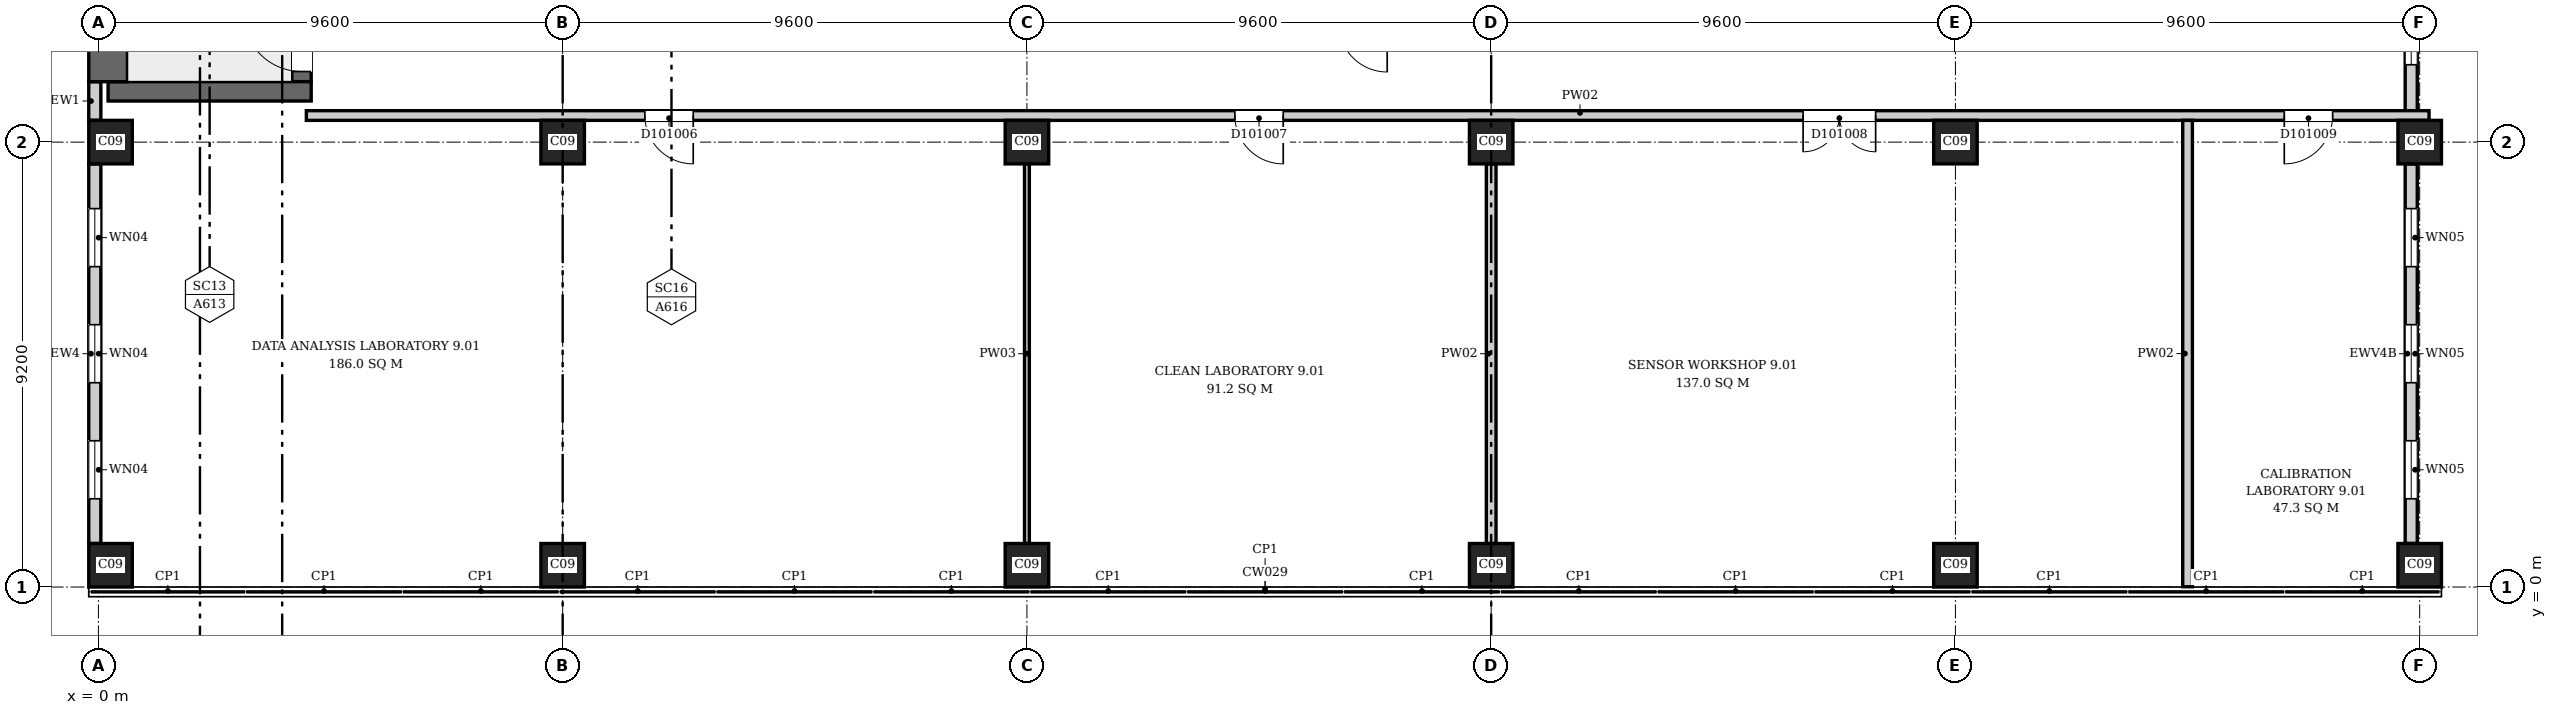
"""IFC4 building model, lengths in metres.
Left out: names, types, materials, properties, quantities, classifications, styles, units other than length and angle.
Written with IfcOpenShell. Run it as: python <this file> out.ifc"""

import sys

from ifc_helpers import new_model, si_unit, direction, frame, frame_2d, origin, origin_2d, place, context, subcontext, project, spatial, rectangle, extrude, element, fill, save


model = new_model("IFC4")
c1 = context("Model", 3, precision=1e-05, world=origin(), true_north=direction((0.0, 1.0)))
c2 = subcontext(c1, "Body", "Model", "MODEL_VIEW")
j1 = project(units=[si_unit("LENGTHUNIT", "METRE"), si_unit("PLANEANGLEUNIT", "RADIAN")], contexts=[c1])
p1 = place(None, origin())
s1 = spatial("IfcSite", under=j1, at=p1, CompositionType="ELEMENT")
p2 = place(p1, origin())
s2 = spatial("IfcBuilding", under=s1, at=p2, CompositionType="ELEMENT")
p3 = place(p2, frame((0.0, 0.0, 48.7)))
s3 = spatial("IfcBuildingStorey", under=s2, at=p3, CompositionType="ELEMENT", Elevation=48.7)
p4 = place(p3, frame((0.2, 10.25, 0.0), z_axis=(0.0, 0.0, 1.0), x_axis=(1.0, 0.0, 0.0)))
e1 = element("IfcWall", 1, at=p4, inside=s3, PredefinedType="SHEAR", context=c2, shape_type="SweptSolid", body=[
    extrude(rectangle(XDim=4.2, YDim=0.4, at=frame_2d((2.1, 0.0))), origin(), (0.0, 0.0, 1.0), 4.2),
])
p5 = place(p3, frame((0.2, 10.45, 0.0), z_axis=(0.0, 0.0, 1.0), x_axis=(0.0, 1.0, 0.0)))
e2 = element("IfcWall", 2, at=p5, inside=s3, PredefinedType="SHEAR", context=c2, shape_type="SweptSolid", body=[
    extrude(rectangle(XDim=6.6, YDim=0.8, at=frame_2d((3.3, 0.0))), origin(), (0.0, 0.0, 1.0), 4.2),
])
p6 = place(p3, frame((4.2, 10.45, 0.0), z_axis=(0.0, 0.0, 1.0), x_axis=(0.0, 1.0, 0.0)))
e3 = element("IfcWall", 3, at=p6, inside=s3, PredefinedType="SHEAR", context=c2, shape_type="SweptSolid", body=[
    extrude(rectangle(XDim=6.6, YDim=0.4, at=frame_2d((3.3, 0.0))), origin(), (0.0, 0.0, 1.0), 4.2),
])
p7 = place(p6, frame((0.21, 0.0, 0.0)))
e4 = element("IfcOpeningElement", 4, at=p7, cuts=e3, PredefinedType="OPENING", context=c2, shape_type="SweptSolid", body=[
    extrude(rectangle(XDim=1.2, YDim=2.1, at=frame_2d((0.6, 1.05))), frame((0.0, 0.21, 0.0), z_axis=(0.0, -1.0, 0.0), x_axis=(1.0, 0.0, 0.0)), (0.0, 0.0, 1.0), 0.42),
])
for number, where, z_axis, x_axis in (
    (5, (0.25, 0.45, 0.0), (0.0, 0.0, 1.0), (1.0, 0.0, 0.0)),
    (6, (9.6, 0.45, 0.0), (0.0, 0.0, 1.0), (1.0, 0.0, 0.0)),
    (7, (19.2, 0.45, 0.0), (0.0, 0.0, 1.0), (1.0, 0.0, 0.0)),
    (8, (28.8, 0.45, 0.0), (0.0, 0.0, 1.0), (1.0, 0.0, 0.0)),
    (9, (38.4, 0.45, 0.0), (0.0, 0.0, 1.0), (1.0, 0.0, 0.0)),
    (10, (48.0, 0.45, 0.0), (0.0, 0.0, 1.0), (1.0, 0.0, 0.0)),
    (11, (0.25, 9.2, 0.0), (0.0, 0.0, 1.0), (1.0, 0.0, 0.0)),
    (12, (9.6, 9.2, 0.0), (0.0, 0.0, 1.0), (1.0, 0.0, 0.0)),
    (13, (19.2, 9.2, 0.0), (0.0, 0.0, 1.0), (1.0, 0.0, 0.0)),
    (14, (28.8, 9.2, 0.0), (0.0, 0.0, 1.0), (1.0, 0.0, 0.0)),
    (15, (38.4, 9.2, 0.0), (0.0, 0.0, 1.0), (1.0, 0.0, 0.0)),
    (16, (48.0, 9.2, 0.0), (0.0, 0.0, 1.0), (1.0, 0.0, 0.0)),
):
    element("IfcColumn", number, at=place(p3, frame(where, z_axis=z_axis, x_axis=x_axis)), inside=s3, PredefinedType="COLUMN", context=c2, shape_type="SweptSolid", body=[
        extrude(rectangle(XDim=0.9, YDim=0.9, at=origin_2d()), origin(), (0.0, 0.0, 1.0), 4.2),
    ])
p8 = place(p3, frame((-0.074, 8.75, 0.0), z_axis=(0.0, 0.0, 1.0), x_axis=(0.0, -1.0, 0.0)))
e17 = element("IfcWall", 17, at=p8, inside=s3, PredefinedType="ELEMENTEDWALL", context=c2, shape_type="SweptSolid", body=[
    extrude(rectangle(XDim=7.85, YDim=0.25, at=frame_2d((3.925, 0.0))), origin(), (0.0, 0.0, 1.0), 3.9),
])
p9 = place(p8, frame((5.725, 0.0, 0.9)))
e18 = element("IfcOpeningElement", 18, at=p9, cuts=e17, PredefinedType="OPENING", context=c2, shape_type="SweptSolid", body=[
    extrude(rectangle(XDim=1.2, YDim=2.6, at=frame_2d((0.6, 1.3))), frame((0.0, 0.135, 0.0), z_axis=(0.0, -1.0, 0.0), x_axis=(1.0, 0.0, 0.0)), (0.0, 0.0, 1.0), 0.27),
])
p10 = place(p8, frame((3.325, 0.0, 0.9)))
e19 = element("IfcOpeningElement", 19, at=p10, cuts=e17, PredefinedType="OPENING", context=c2, shape_type="SweptSolid", body=[
    extrude(rectangle(XDim=1.2, YDim=2.6, at=frame_2d((0.6, 1.3))), frame((0.0, 0.135, 0.0), z_axis=(0.0, -1.0, 0.0), x_axis=(1.0, 0.0, 0.0)), (0.0, 0.0, 1.0), 0.27),
])
p11 = place(p8, frame((0.925, 0.0, 0.9)))
e20 = element("IfcOpeningElement", 20, at=p11, cuts=e17, PredefinedType="OPENING", context=c2, shape_type="SweptSolid", body=[
    extrude(rectangle(XDim=1.2, YDim=2.6, at=frame_2d((0.6, 1.3))), frame((0.0, 0.135, 0.0), z_axis=(0.0, -1.0, 0.0), x_axis=(1.0, 0.0, 0.0)), (0.0, 0.0, 1.0), 0.27),
])
p12 = place(p3, frame((-0.074, 10.45, 0.0), z_axis=(0.0, 0.0, 1.0), x_axis=(0.0, -1.0, 0.0)))
e21 = element("IfcWall", 21, at=p12, inside=s3, PredefinedType="ELEMENTEDWALL", context=c2, shape_type="SweptSolid", body=[
    extrude(rectangle(XDim=0.8, YDim=0.25, at=frame_2d((0.4, 0.0))), origin(), (0.0, 0.0, 1.0), 3.9),
])
p13 = place(p3, frame((47.825, 0.9, 0.0), z_axis=(0.0, 0.0, 1.0), x_axis=(0.0, 1.0, 0.0)))
e22 = element("IfcWall", 22, at=p13, inside=s3, PredefinedType="ELEMENTEDWALL", context=c2, shape_type="SweptSolid", body=[
    extrude(rectangle(XDim=7.85, YDim=0.25, at=frame_2d((3.925, 0.0))), origin(), (0.0, 0.0, 1.0), 3.3),
])
p14 = place(p13, frame((0.925, 0.0, 0.6)))
e23 = element("IfcOpeningElement", 23, at=p14, cuts=e22, PredefinedType="OPENING", context=c2, shape_type="SweptSolid", body=[
    extrude(rectangle(XDim=1.2, YDim=2.6, at=frame_2d((0.6, 1.3))), frame((0.0, 0.135, 0.0), z_axis=(0.0, -1.0, 0.0), x_axis=(1.0, 0.0, 0.0)), (0.0, 0.0, 1.0), 0.27),
])
p15 = place(p13, frame((3.325, 0.0, 0.6)))
e24 = element("IfcOpeningElement", 24, at=p15, cuts=e22, PredefinedType="OPENING", context=c2, shape_type="SweptSolid", body=[
    extrude(rectangle(XDim=1.2, YDim=2.6, at=frame_2d((0.6, 1.3))), frame((0.0, 0.135, 0.0), z_axis=(0.0, -1.0, 0.0), x_axis=(1.0, 0.0, 0.0)), (0.0, 0.0, 1.0), 0.27),
])
p16 = place(p13, frame((5.725, 0.0, 0.6)))
e25 = element("IfcOpeningElement", 25, at=p16, cuts=e22, PredefinedType="OPENING", context=c2, shape_type="SweptSolid", body=[
    extrude(rectangle(XDim=1.2, YDim=2.6, at=frame_2d((0.6, 1.3))), frame((0.0, 0.135, 0.0), z_axis=(0.0, -1.0, 0.0), x_axis=(1.0, 0.0, 0.0)), (0.0, 0.0, 1.0), 0.27),
])
p17 = place(p3, frame((47.825, 9.65, 0.0), z_axis=(0.0, 0.0, 1.0), x_axis=(0.0, 1.0, 0.0)))
e26 = element("IfcWall", 26, at=p17, inside=s3, PredefinedType="ELEMENTEDWALL", context=c2, shape_type="SweptSolid", body=[
    extrude(rectangle(XDim=8.3, YDim=0.25, at=frame_2d((4.15, 0.0))), origin(), (0.0, 0.0, 1.0), 3.3),
])
p18 = place(p17, frame((1.15, 0.0, 0.6)))
e27 = element("IfcOpeningElement", 27, at=p18, cuts=e26, PredefinedType="OPENING", context=c2, shape_type="SweptSolid", body=[
    extrude(rectangle(XDim=1.2, YDim=2.6, at=frame_2d((0.6, 1.3))), frame((0.0, 0.135, 0.0), z_axis=(0.0, -1.0, 0.0), x_axis=(1.0, 0.0, 0.0)), (0.0, 0.0, 1.0), 0.27),
])
p19 = place(p17, frame((3.55, 0.0, 0.6)))
e28 = element("IfcOpeningElement", 28, at=p19, cuts=e26, PredefinedType="OPENING", context=c2, shape_type="SweptSolid", body=[
    extrude(rectangle(XDim=1.2, YDim=2.6, at=frame_2d((0.6, 1.3))), frame((0.0, 0.135, 0.0), z_axis=(0.0, -1.0, 0.0), x_axis=(1.0, 0.0, 0.0)), (0.0, 0.0, 1.0), 0.27),
])
p20 = place(p17, frame((5.95, 0.0, 0.6)))
e29 = element("IfcOpeningElement", 29, at=p20, cuts=e26, PredefinedType="OPENING", context=c2, shape_type="SweptSolid", body=[
    extrude(rectangle(XDim=1.2, YDim=2.6, at=frame_2d((0.6, 1.3))), frame((0.0, 0.135, 0.0), z_axis=(0.0, -1.0, 0.0), x_axis=(1.0, 0.0, 0.0)), (0.0, 0.0, 1.0), 0.27),
])
p21 = place(p3, frame((4.3, 9.75, 0.0), z_axis=(0.0, 0.0, 1.0), x_axis=(1.0, 0.0, 0.0)))
e30 = element("IfcWall", 30, at=p21, inside=s3, PredefinedType="PARTITIONING", context=c2, shape_type="SweptSolid", body=[
    extrude(rectangle(XDim=43.894, YDim=0.2, at=frame_2d((21.947, 0.0))), origin(), (0.0, 0.0, 1.0), 3.9),
])
p22 = place(p21, frame((7.0, 0.0, 0.0)))
e31 = element("IfcOpeningElement", 31, at=p22, cuts=e30, PredefinedType="OPENING", context=c2, shape_type="SweptSolid", body=[
    extrude(rectangle(XDim=1.0, YDim=2.1, at=frame_2d((0.5, 1.05))), frame((0.0, 0.11, 0.0), z_axis=(0.0, -1.0, 0.0), x_axis=(1.0, 0.0, 0.0)), (0.0, 0.0, 1.0), 0.22),
])
p23 = place(p21, frame((19.2, 0.0, 0.0)))
e32 = element("IfcOpeningElement", 32, at=p23, cuts=e30, PredefinedType="OPENING", context=c2, shape_type="SweptSolid", body=[
    extrude(rectangle(XDim=1.0, YDim=2.1, at=frame_2d((0.5, 1.05))), frame((0.0, 0.11, 0.0), z_axis=(0.0, -1.0, 0.0), x_axis=(1.0, 0.0, 0.0)), (0.0, 0.0, 1.0), 0.22),
])
p24 = place(p21, frame((30.95, 0.0, 0.0)))
e33 = element("IfcOpeningElement", 33, at=p24, cuts=e30, PredefinedType="OPENING", context=c2, shape_type="SweptSolid", body=[
    extrude(rectangle(XDim=1.5, YDim=2.1, at=frame_2d((0.75, 1.05))), frame((0.0, 0.11, 0.0), z_axis=(0.0, -1.0, 0.0), x_axis=(1.0, 0.0, 0.0)), (0.0, 0.0, 1.0), 0.22),
])
p25 = place(p21, frame((40.9, 0.0, 0.0)))
e34 = element("IfcOpeningElement", 34, at=p25, cuts=e30, PredefinedType="OPENING", context=c2, shape_type="SweptSolid", body=[
    extrude(rectangle(XDim=1.0, YDim=2.1, at=frame_2d((0.5, 1.05))), frame((0.0, 0.11, 0.0), z_axis=(0.0, -1.0, 0.0), x_axis=(1.0, 0.0, 0.0)), (0.0, 0.0, 1.0), 0.22),
])
p26 = place(p3, frame((19.2, 0.9, 0.0), z_axis=(0.0, 0.0, 1.0), x_axis=(0.0, 1.0, 0.0)))
e35 = element("IfcWall", 35, at=p26, inside=s3, PredefinedType="PARTITIONING", context=c2, shape_type="SweptSolid", body=[
    extrude(rectangle(XDim=7.85, YDim=0.1, at=frame_2d((3.925, 0.0))), origin(), (0.0, 0.0, 1.0), 3.9),
])
p27 = place(p3, frame((28.8, 0.9, 0.0), z_axis=(0.0, 0.0, 1.0), x_axis=(0.0, 1.0, 0.0)))
e36 = element("IfcWall", 36, at=p27, inside=s3, PredefinedType="PARTITIONING", context=c2, shape_type="SweptSolid", body=[
    extrude(rectangle(XDim=7.85, YDim=0.2, at=frame_2d((3.925, 0.0))), origin(), (0.0, 0.0, 1.0), 3.9),
])
p28 = place(p3, frame((43.2, 0.006, 0.0), z_axis=(0.0, 0.0, 1.0), x_axis=(0.0, 1.0, 0.0)))
e37 = element("IfcWall", 37, at=p28, inside=s3, PredefinedType="PARTITIONING", context=c2, shape_type="SweptSolid", body=[
    extrude(rectangle(XDim=9.644, YDim=0.2, at=frame_2d((4.822, 0.0))), origin(), (0.0, 0.0, 1.0), 3.9),
])
p29 = place(p9, origin())
e38 = element("IfcWindow", 38, at=p29, inside=s3, PartitioningType="SINGLE_PANEL", PredefinedType="WINDOW", context=c2, shape_type="SweptSolid", body=[
    extrude(rectangle(XDim=1.2, YDim=2.6, at=frame_2d((0.6, 1.3))), frame((0.0, 0.03, 0.0), z_axis=(0.0, -1.0, 0.0), x_axis=(1.0, 0.0, 0.0)), (0.0, 0.0, 1.0), 0.06),
])
fill(e18, e38)
p30 = place(p10, origin())
e39 = element("IfcWindow", 39, at=p30, inside=s3, PartitioningType="SINGLE_PANEL", PredefinedType="WINDOW", context=c2, shape_type="SweptSolid", body=[
    extrude(rectangle(XDim=1.2, YDim=2.6, at=frame_2d((0.6, 1.3))), frame((0.0, 0.03, 0.0), z_axis=(0.0, -1.0, 0.0), x_axis=(1.0, 0.0, 0.0)), (0.0, 0.0, 1.0), 0.06),
])
fill(e19, e39)
p31 = place(p11, origin())
e40 = element("IfcWindow", 40, at=p31, inside=s3, PartitioningType="SINGLE_PANEL", PredefinedType="WINDOW", context=c2, shape_type="SweptSolid", body=[
    extrude(rectangle(XDim=1.2, YDim=2.6, at=frame_2d((0.6, 1.3))), frame((0.0, 0.03, 0.0), z_axis=(0.0, -1.0, 0.0), x_axis=(1.0, 0.0, 0.0)), (0.0, 0.0, 1.0), 0.06),
])
fill(e20, e40)
p32 = place(p14, origin())
e41 = element("IfcWindow", 41, at=p32, inside=s3, PartitioningType="SINGLE_PANEL", PredefinedType="WINDOW", context=c2, shape_type="SweptSolid", body=[
    extrude(rectangle(XDim=1.2, YDim=2.6, at=frame_2d((0.6, 1.3))), frame((0.0, 0.03, 0.0), z_axis=(0.0, -1.0, 0.0), x_axis=(1.0, 0.0, 0.0)), (0.0, 0.0, 1.0), 0.06),
])
fill(e23, e41)
p33 = place(p15, origin())
e42 = element("IfcWindow", 42, at=p33, inside=s3, PartitioningType="SINGLE_PANEL", PredefinedType="WINDOW", context=c2, shape_type="SweptSolid", body=[
    extrude(rectangle(XDim=1.2, YDim=2.6, at=frame_2d((0.6, 1.3))), frame((0.0, 0.03, 0.0), z_axis=(0.0, -1.0, 0.0), x_axis=(1.0, 0.0, 0.0)), (0.0, 0.0, 1.0), 0.06),
])
fill(e24, e42)
p34 = place(p16, origin())
e43 = element("IfcWindow", 43, at=p34, inside=s3, PartitioningType="SINGLE_PANEL", PredefinedType="WINDOW", context=c2, shape_type="SweptSolid", body=[
    extrude(rectangle(XDim=1.2, YDim=2.6, at=frame_2d((0.6, 1.3))), frame((0.0, 0.03, 0.0), z_axis=(0.0, -1.0, 0.0), x_axis=(1.0, 0.0, 0.0)), (0.0, 0.0, 1.0), 0.06),
])
fill(e25, e43)
p35 = place(p18, origin())
e44 = element("IfcWindow", 44, at=p35, inside=s3, PartitioningType="SINGLE_PANEL", PredefinedType="WINDOW", context=c2, shape_type="SweptSolid", body=[
    extrude(rectangle(XDim=1.2, YDim=2.6, at=frame_2d((0.6, 1.3))), frame((0.0, 0.03, 0.0), z_axis=(0.0, -1.0, 0.0), x_axis=(1.0, 0.0, 0.0)), (0.0, 0.0, 1.0), 0.06),
])
fill(e27, e44)
p36 = place(p7, origin())
e45 = element("IfcDoor", 45, at=p36, inside=s3, OperationType="SINGLE_SWING_RIGHT", PredefinedType="DOOR", context=c2, shape_type="SweptSolid", body=[
    extrude(rectangle(XDim=1.2, YDim=2.1, at=frame_2d((0.6, 1.05))), frame((0.0, 0.025, 0.0), z_axis=(0.0, -1.0, 0.0), x_axis=(1.0, 0.0, 0.0)), (0.0, 0.0, 1.0), 0.05),
])
fill(e4, e45)
p37 = place(p22, origin())
e46 = element("IfcDoor", 46, at=p37, inside=s3, OperationType="SINGLE_SWING_RIGHT", PredefinedType="DOOR", context=c2, shape_type="SweptSolid", body=[
    extrude(rectangle(XDim=1.0, YDim=2.1, at=frame_2d((0.5, 1.05))), frame((0.0, 0.025, 0.0), z_axis=(0.0, -1.0, 0.0), x_axis=(1.0, 0.0, 0.0)), (0.0, 0.0, 1.0), 0.05),
])
fill(e31, e46)
p38 = place(p23, origin())
e47 = element("IfcDoor", 47, at=p38, inside=s3, OperationType="SINGLE_SWING_RIGHT", PredefinedType="DOOR", context=c2, shape_type="SweptSolid", body=[
    extrude(rectangle(XDim=1.0, YDim=2.1, at=frame_2d((0.5, 1.05))), frame((0.0, 0.025, 0.0), z_axis=(0.0, -1.0, 0.0), x_axis=(1.0, 0.0, 0.0)), (0.0, 0.0, 1.0), 0.05),
])
fill(e32, e47)
p39 = place(p24, origin())
e48 = element("IfcDoor", 48, at=p39, inside=s3, OperationType="DOUBLE_DOOR_SINGLE_SWING", PredefinedType="DOOR", context=c2, shape_type="SweptSolid", body=[
    extrude(rectangle(XDim=1.5, YDim=2.1, at=frame_2d((0.75, 1.05))), frame((0.0, 0.025, 0.0), z_axis=(0.0, -1.0, 0.0), x_axis=(1.0, 0.0, 0.0)), (0.0, 0.0, 1.0), 0.05),
])
fill(e33, e48)
p40 = place(p25, origin())
e49 = element("IfcDoor", 49, at=p40, inside=s3, OperationType="SINGLE_SWING_LEFT", PredefinedType="DOOR", context=c2, shape_type="SweptSolid", body=[
    extrude(rectangle(XDim=1.0, YDim=2.1, at=frame_2d((0.5, 1.05))), frame((0.0, 0.025, 0.0), z_axis=(0.0, -1.0, 0.0), x_axis=(1.0, 0.0, 0.0)), (0.0, 0.0, 1.0), 0.05),
])
fill(e34, e49)
save(model, sys.argv[1])
